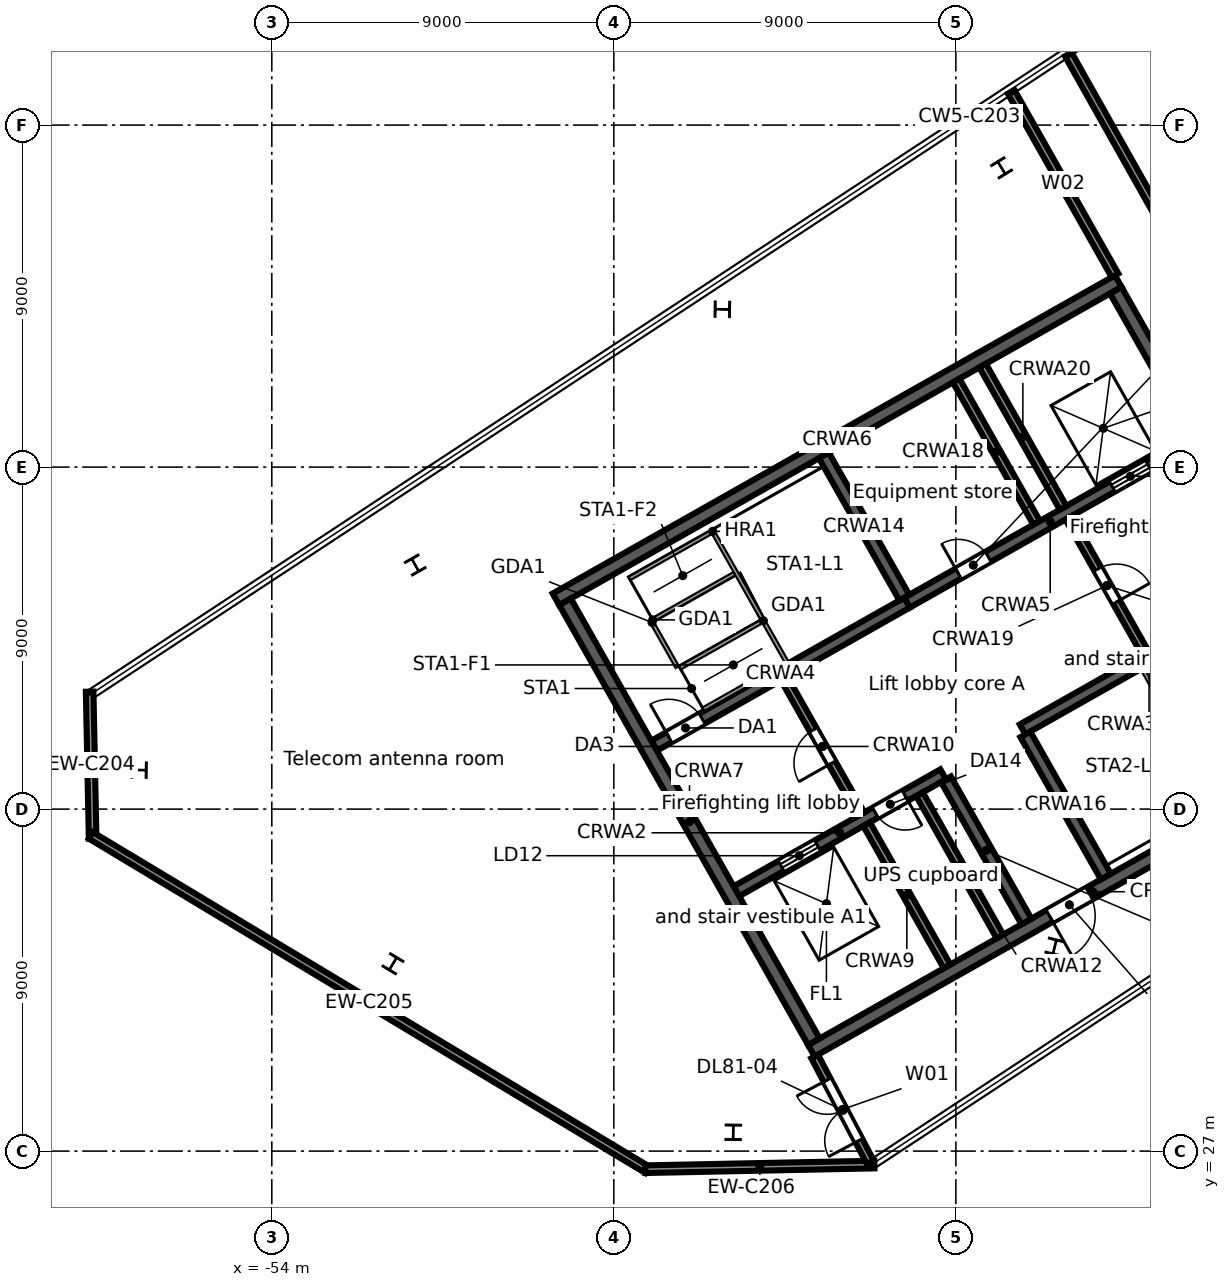
"""IFC4 building model, lengths in metres.
Left out: names, types, materials, properties, quantities, classifications, styles, units other than length and angle.
Written with IfcOpenShell. Run it as: python <this file> out.ifc"""

import sys

from ifc_helpers import new_model, si_unit, direction, frame, frame_2d, origin, origin_2d, place, context, subcontext, project, spatial, rectangle, i_section, extrude, element, fill, save


model = new_model("IFC4")
c1 = context("Model", 3, precision=1e-05, world=origin(), true_north=direction((0.0, 1.0)))
c2 = subcontext(c1, "Body", "Model", "MODEL_VIEW")
j1 = project(units=[si_unit("LENGTHUNIT", "METRE"), si_unit("PLANEANGLEUNIT", "RADIAN")], contexts=[c1])
p1 = place(None, origin())
s1 = spatial("IfcSite", under=j1, at=p1, CompositionType="ELEMENT")
p2 = place(p1, origin())
s2 = spatial("IfcBuilding", under=s1, at=p2, CompositionType="ELEMENT")
p3 = place(p2, frame((0.0, 0.0, 357.7)))
s3 = spatial("IfcBuildingStorey", under=s2, at=p3, CompositionType="ELEMENT", Elevation=357.7)
p4 = place(p3, frame((-50.226, 42.423, 0.0), z_axis=(0.0, 0.0, 1.0), x_axis=(-0.87035569594, -0.492423560103, 0.0)))
e1 = element("IfcColumn", 1, at=p4, inside=s3, PredefinedType="COLUMN", context=c2, shape_type="SweptSolid", body=[
    extrude(i_section(OverallWidth=0.4, OverallDepth=0.4, WebThickness=0.013, FlangeThickness=0.021, FilletRadius=0.022, at=origin_2d()), origin(), (0.0, 0.0, 1.0), 3.3),
])
for number, where, z_axis, x_axis in (
    (2, (-57.493, 37.027, 0.0), (0.0, 0.0, 1.0), (-0.013, -1.0, 0.0)),
    (3, (-50.812, 31.931, 0.0), (0.0, 0.0, 1.0), (0.857, -0.515, 0.0)),
    (4, (-41.858, 27.495, 0.0), (0.0, 0.0, 1.0), (1.0, -0.013, 0.0)),
):
    element("IfcColumn", number, at=place(p3, frame(where, z_axis=z_axis, x_axis=x_axis)), inside=s3, PredefinedType="COLUMN", context=c2, shape_type="SweptSolid", body=[
        extrude(i_section(OverallWidth=0.4, OverallDepth=0.4, WebThickness=0.013, FlangeThickness=0.021, FilletRadius=0.022, at=origin_2d()), origin(), (0.0, 0.0, 1.0), 3.6),
    ])
p5 = place(p3, frame((-34.798, 52.875, 0.0), z_axis=(0.0, 0.0, 1.0), x_axis=(0.85345985094, 0.521158596622, 0.0)))
e5 = element("IfcColumn", 5, at=p5, inside=s3, PredefinedType="COLUMN", context=c2, shape_type="SweptSolid", body=[
    extrude(i_section(OverallWidth=0.4, OverallDepth=0.4, WebThickness=0.013, FlangeThickness=0.021, FilletRadius=0.022, at=origin_2d()), origin(), (0.0, 0.0, 1.0), 3.3),
])
p6 = place(p3, frame((-42.144, 49.153, 0.0), z_axis=(0.0, 0.0, 1.0), x_axis=(0.017539659542, 0.999846168339, 0.0)))
e6 = element("IfcColumn", 6, at=p6, inside=s3, PredefinedType="COLUMN", context=c2, shape_type="SweptSolid", body=[
    extrude(i_section(OverallWidth=0.4, OverallDepth=0.4, WebThickness=0.013, FlangeThickness=0.021, FilletRadius=0.022, at=origin_2d()), origin(), (0.0, 0.0, 1.0), 3.6),
])
p7 = place(p3, frame((-33.4, 32.374, 0.0), z_axis=(0.0, 0.0, 1.0), x_axis=(-0.971092633177, 0.238702948851, 0.0)))
e7 = element("IfcColumn", 7, at=p7, inside=s3, PredefinedType="COLUMN", context=c2, shape_type="SweptSolid", body=[
    extrude(i_section(OverallWidth=0.4, OverallDepth=0.4, WebThickness=0.013, FlangeThickness=0.021, FilletRadius=0.022, at=origin_2d()), origin(), (0.0, 0.0, 1.0), 3.3),
])
p8 = place(p3, frame((-58.715, 35.225, 0.0), z_axis=(0.0, 0.0, 1.0), x_axis=(-0.020271225376, 0.999794517599, 0.0)))
e8 = element("IfcWall", 8, at=p8, inside=s3, PredefinedType="STANDARD", context=c2, shape_type="SweptSolid", body=[
    extrude(rectangle(XDim=3.866, YDim=0.2, at=frame_2d((1.933, 0.0))), origin(), (0.0, 0.0, 1.0), 3.3),
])
p9 = place(p3, frame((-44.119, 26.51, 0.0), z_axis=(0.0, 0.0, 1.0), x_axis=(-0.857172484352, 0.515029447769, 0.0)))
e9 = element("IfcWall", 9, at=p9, inside=s3, PredefinedType="STANDARD", context=c2, shape_type="SweptSolid", body=[
    extrude(rectangle(XDim=17.084, YDim=0.2, at=frame_2d((8.542, 0.0))), origin(), (0.0, 0.0, 1.0), 3.3),
])
p10 = place(p3, frame((-38.144, 26.646, 0.0), z_axis=(0.0, 0.0, 1.0), x_axis=(-0.999795108808, -0.020242045449, 0.0)))
e10 = element("IfcWall", 10, at=p10, inside=s3, PredefinedType="STANDARD", context=c2, shape_type="SweptSolid", body=[
    extrude(rectangle(XDim=6.031, YDim=0.2, at=frame_2d((3.015, 0.0))), origin(), (0.0, 0.0, 1.0), 3.3),
])
p11 = place(p3, frame((-39.801, 29.64, 0.0), z_axis=(0.0, 0.0, 1.0), x_axis=(0.870359753402, 0.492416388494, 0.0)))
e11 = element("IfcWall", 11, at=p11, inside=s3, PredefinedType="SOLIDWALL", context=c2, shape_type="SweptSolid", body=[
    extrude(rectangle(XDim=17.0, YDim=0.35, at=frame_2d((8.5, 0.0))), origin(), (0.0, 0.0, 1.0), 3.3),
])
p12 = place(p11, frame((7.2, 0.0, 0.0)))
e12 = element("IfcOpeningElement", 12, at=p12, cuts=e11, PredefinedType="OPENING", context=c2, shape_type="SweptSolid", body=[
    extrude(rectangle(XDim=1.2, YDim=2.1, at=frame_2d((0.6, 1.05))), frame((0.0, 0.185, 0.0), z_axis=(0.0, -1.0, 0.0), x_axis=(1.0, 0.0, 0.0)), (0.0, 0.0, 1.0), 0.37),
])
p13 = place(p3, frame((-41.774, 33.838, 0.0), z_axis=(0.0, 0.0, 1.0), x_axis=(0.870355415866, 0.492424055132, 0.0)))
e13 = element("IfcWall", 13, at=p13, inside=s3, PredefinedType="SOLIDWALL", context=c2, shape_type="SweptSolid", body=[
    extrude(rectangle(XDim=6.25, YDim=0.3, at=frame_2d((3.125, 0.0))), origin(), (0.0, 0.0, 1.0), 3.3),
])
p14 = place(p13, frame((1.35, 0.0, 0.0)))
e14 = element("IfcOpeningElement", 14, at=p14, cuts=e13, PredefinedType="OPENING", context=c2, shape_type="SweptSolid", body=[
    extrude(rectangle(XDim=1.1, YDim=2.1, at=frame_2d((0.55, 1.05))), frame((0.0, 0.16, 0.0), z_axis=(0.0, -1.0, 0.0), x_axis=(1.0, 0.0, 0.0)), (0.0, 0.0, 1.0), 0.32),
])
p15 = place(p13, frame((4.2, 0.0, 0.0)))
e15 = element("IfcOpeningElement", 15, at=p15, cuts=e13, PredefinedType="OPENING", context=c2, shape_type="SweptSolid", body=[
    extrude(rectangle(XDim=0.9, YDim=2.1, at=frame_2d((0.45, 1.05))), frame((0.0, 0.16, 0.0), z_axis=(0.0, -1.0, 0.0), x_axis=(1.0, 0.0, 0.0)), (0.0, 0.0, 1.0), 0.32),
])
p16 = place(p3, frame((-34.245, 38.097, 0.0), z_axis=(0.0, 0.0, 1.0), x_axis=(0.870352347706, 0.49242947804, 0.0)))
e16 = element("IfcWall", 16, at=p16, inside=s3, PredefinedType="SOLIDWALL", context=c2, shape_type="SweptSolid", body=[
    extrude(rectangle(XDim=7.65, YDim=0.3, at=frame_2d((3.825, 0.0))), origin(), (0.0, 0.0, 1.0), 3.3),
])
p17 = place(p16, frame((6.2, 0.0, 0.0)))
e17 = element("IfcOpeningElement", 17, at=p17, cuts=e16, PredefinedType="OPENING", context=c2, shape_type="SweptSolid", body=[
    extrude(rectangle(XDim=1.0, YDim=2.1, at=frame_2d((0.5, 1.05))), frame((0.0, 0.16, 0.0), z_axis=(0.0, -1.0, 0.0), x_axis=(1.0, 0.0, 0.0)), (0.0, 0.0, 1.0), 0.32),
])
p18 = place(p3, frame((-43.94, 37.667, 0.0), z_axis=(0.0, 0.0, 1.0), x_axis=(0.870352347706, 0.49242947804, 0.0)))
e18 = element("IfcWall", 18, at=p18, inside=s3, PredefinedType="SOLIDWALL", context=c2, shape_type="SweptSolid", body=[
    extrude(rectangle(XDim=7.65, YDim=0.3, at=frame_2d((3.825, 0.0))), origin(), (0.0, 0.0, 1.0), 3.3),
])
p19 = place(p18, frame((0.45, 0.0, 0.0)))
e19 = element("IfcOpeningElement", 19, at=p19, cuts=e18, PredefinedType="OPENING", context=c2, shape_type="SweptSolid", body=[
    extrude(rectangle(XDim=1.0, YDim=2.1, at=frame_2d((0.5, 1.05))), frame((0.0, 0.16, 0.0), z_axis=(0.0, -1.0, 0.0), x_axis=(1.0, 0.0, 0.0)), (0.0, 0.0, 1.0), 0.32),
])
p20 = place(p3, frame((-37.282, 41.435, 0.0), z_axis=(0.0, 0.0, 1.0), x_axis=(0.870364588774, 0.492407841741, 0.0)))
e20 = element("IfcWall", 20, at=p20, inside=s3, PredefinedType="SOLIDWALL", context=c2, shape_type="SweptSolid", body=[
    extrude(rectangle(XDim=8.65, YDim=0.3, at=frame_2d((4.325, 0.0))), origin(), (0.0, 0.0, 1.0), 3.3),
])
p21 = place(p20, frame((6.2, 0.0, 0.0)))
e21 = element("IfcOpeningElement", 21, at=p21, cuts=e20, PredefinedType="OPENING", context=c2, shape_type="SweptSolid", body=[
    extrude(rectangle(XDim=1.1, YDim=2.1, at=frame_2d((0.55, 1.05))), frame((0.0, 0.16, 0.0), z_axis=(0.0, -1.0, 0.0), x_axis=(1.0, 0.0, 0.0)), (0.0, 0.0, 1.0), 0.32),
])
p22 = place(p20, frame((1.55, 0.0, 0.0)))
e22 = element("IfcOpeningElement", 22, at=p22, cuts=e20, PredefinedType="OPENING", context=c2, shape_type="SweptSolid", body=[
    extrude(rectangle(XDim=0.9, YDim=2.1, at=frame_2d((0.45, 1.05))), frame((0.0, 0.16, 0.0), z_axis=(0.0, -1.0, 0.0), x_axis=(1.0, 0.0, 0.0)), (0.0, 0.0, 1.0), 0.32),
])
p23 = place(p3, frame((-46.522, 41.521, 0.0), z_axis=(0.0, 0.0, 1.0), x_axis=(0.870359753402, 0.492416388494, 0.0)))
e23 = element("IfcWall", 23, at=p23, inside=s3, PredefinedType="SOLIDWALL", context=c2, shape_type="SweptSolid", body=[
    extrude(rectangle(XDim=17.0, YDim=0.35, at=frame_2d((8.5, 0.0))), origin(), (0.0, 0.0, 1.0), 3.3),
])
p24 = place(p3, frame((-46.284, 41.454, 0.0), z_axis=(0.0, 0.0, 1.0), x_axis=(0.492429810477, -0.870352159619, 0.0)))
e24 = element("IfcWall", 24, at=p24, inside=s3, PredefinedType="SOLIDWALL", context=c2, shape_type="SweptSolid", body=[
    extrude(rectangle(XDim=13.3, YDim=0.35, at=frame_2d((6.65, 0.0))), origin(), (0.0, 0.0, 1.0), 3.3),
])
p25 = place(p3, frame((-38.349, 35.603, 0.0), z_axis=(0.0, 0.0, 1.0), x_axis=(0.492410799949, -0.870362915164, 0.0)))
e25 = element("IfcWall", 25, at=p25, inside=s3, PredefinedType="SOLIDWALL", context=c2, shape_type="SweptSolid", body=[
    extrude(rectangle(XDim=4.3, YDim=0.2, at=frame_2d((2.15, 0.0))), origin(), (0.0, 0.0, 1.0), 3.3),
])
p26 = place(p3, frame((-40.516, 39.433, 0.0), z_axis=(0.0, 0.0, 1.0), x_axis=(0.492453559952, -0.87033872216, 0.0)))
e26 = element("IfcWall", 26, at=p26, inside=s3, PredefinedType="PARTITIONING", context=c2, shape_type="SweptSolid", body=[
    extrude(rectangle(XDim=4.1, YDim=0.2, at=frame_2d((2.05, 0.0))), origin(), (0.0, 0.0, 1.0), 3.3),
])
p27 = place(p26, frame((1.55, 0.0, 0.0)))
e27 = element("IfcOpeningElement", 27, at=p27, cuts=e26, PredefinedType="OPENING", context=c2, shape_type="SweptSolid", body=[
    extrude(rectangle(XDim=1.0, YDim=2.1, at=frame_2d((0.5, 1.05))), frame((0.0, 0.11, 0.0), z_axis=(0.0, -1.0, 0.0), x_axis=(1.0, 0.0, 0.0)), (0.0, 0.0, 1.0), 0.22),
])
p28 = place(p3, frame((-36.956, 36.391, 0.0), z_axis=(0.0, 0.0, 1.0), x_axis=(0.492410799949, -0.870362915164, 0.0)))
e28 = element("IfcWall", 28, at=p28, inside=s3, PredefinedType="SOLIDWALL", context=c2, shape_type="SweptSolid", body=[
    extrude(rectangle(XDim=4.3, YDim=0.2, at=frame_2d((2.15, 0.0))), origin(), (0.0, 0.0, 1.0), 3.3),
])
p29 = place(p3, frame((-36.26, 36.785, 0.0), z_axis=(0.0, 0.0, 1.0), x_axis=(0.492435133428, -0.870349147967, 0.0)))
e29 = element("IfcWall", 29, at=p29, inside=s3, PredefinedType="SOLIDWALL", context=c2, shape_type="SweptSolid", body=[
    extrude(rectangle(XDim=4.3, YDim=0.3, at=frame_2d((2.15, 0.0))), origin(), (0.0, 0.0, 1.0), 3.3),
])
p30 = place(p3, frame((-39.473, 45.308, 0.0), z_axis=(0.0, 0.0, 1.0), x_axis=(0.492410799949, -0.870362915164, 0.0)))
e30 = element("IfcWall", 30, at=p30, inside=s3, PredefinedType="SOLIDWALL", context=c2, shape_type="SweptSolid", body=[
    extrude(rectangle(XDim=4.3, YDim=0.3, at=frame_2d((2.15, 0.0))), origin(), (0.0, 0.0, 1.0), 3.3),
])
p31 = place(p3, frame((-34.171, 37.967, 0.0), z_axis=(0.0, 0.0, 1.0), x_axis=(0.492435133428, -0.870349147967, 0.0)))
e31 = element("IfcWall", 31, at=p31, inside=s3, PredefinedType="SOLIDWALL", context=c2, shape_type="SweptSolid", body=[
    extrude(rectangle(XDim=4.3, YDim=0.3, at=frame_2d((2.15, 0.0))), origin(), (0.0, 0.0, 1.0), 3.3),
])
p32 = place(p3, frame((-35.992, 47.277, 0.0), z_axis=(0.0, 0.0, 1.0), x_axis=(0.492410799949, -0.870362915164, 0.0)))
e32 = element("IfcWall", 32, at=p32, inside=s3, PredefinedType="SOLIDWALL", context=c2, shape_type="SweptSolid", body=[
    extrude(rectangle(XDim=4.3, YDim=0.2, at=frame_2d((2.15, 0.0))), origin(), (0.0, 0.0, 1.0), 3.3),
])
p33 = place(p3, frame((-33.031, 43.667, 0.0), z_axis=(0.0, 0.0, 1.0), x_axis=(0.492408451753, -0.87036424366, 0.0)))
e33 = element("IfcWall", 33, at=p33, inside=s3, PredefinedType="PARTITIONING", context=c2, shape_type="SweptSolid", body=[
    extrude(rectangle(XDim=4.1, YDim=0.2, at=frame_2d((2.05, 0.0))), origin(), (0.0, 0.0, 1.0), 3.3),
])
p34 = place(p33, frame((1.55, 0.0, 0.0)))
e34 = element("IfcOpeningElement", 34, at=p34, cuts=e33, PredefinedType="OPENING", context=c2, shape_type="SweptSolid", body=[
    extrude(rectangle(XDim=1.0, YDim=2.1, at=frame_2d((0.5, 1.05))), frame((0.0, 0.11, 0.0), z_axis=(0.0, -1.0, 0.0), x_axis=(1.0, 0.0, 0.0)), (0.0, 0.0, 1.0), 0.22),
])
p35 = place(p3, frame((-35.296, 47.671, 0.0), z_axis=(0.0, 0.0, 1.0), x_axis=(0.492435133428, -0.870349147967, 0.0)))
e35 = element("IfcWall", 35, at=p35, inside=s3, PredefinedType="SOLIDWALL", context=c2, shape_type="SweptSolid", body=[
    extrude(rectangle(XDim=4.3, YDim=0.2, at=frame_2d((2.15, 0.0))), origin(), (0.0, 0.0, 1.0), 3.3),
])
p36 = place(p3, frame((-31.792, 49.653, 0.0), z_axis=(0.0, 0.0, 1.0), x_axis=(0.492421943245, -0.870356610712, 0.0)))
e36 = element("IfcWall", 36, at=p36, inside=s3, PredefinedType="SOLIDWALL", context=c2, shape_type="SweptSolid", body=[
    extrude(rectangle(XDim=13.3, YDim=0.35, at=frame_2d((6.65, 0.0))), origin(), (0.0, 0.0, 1.0), 3.3),
])
p37 = place(p3, frame((-39.715, 29.488, 0.0), z_axis=(0.0, 0.0, 1.0), x_axis=(0.465711249011, -0.884936739289, 0.0)))
e37 = element("IfcWall", 37, at=p37, inside=s3, PredefinedType="PARTITIONING", context=c2, shape_type="SweptSolid", body=[
    extrude(rectangle(XDim=3.146, YDim=0.2, at=frame_2d((1.573, 0.0))), origin(), (0.0, 0.0, 1.0), 2.68),
])
p38 = place(p37, frame((0.7, 0.0, 0.0)))
e38 = element("IfcOpeningElement", 38, at=p38, cuts=e37, PredefinedType="OPENING", context=c2, shape_type="SweptSolid", body=[
    extrude(rectangle(XDim=1.8, YDim=2.1, at=frame_2d((0.9, 1.05))), frame((0.0, 0.11, 0.0), z_axis=(0.0, -1.0, 0.0), x_axis=(1.0, 0.0, 0.0)), (0.0, 0.0, 1.0), 0.22),
])
p39 = place(p3, frame((-34.544, 54.873, 0.0), z_axis=(0.0, 0.0, 1.0), x_axis=(0.492390708412, -0.870374281714, 0.0)))
e39 = element("IfcWall", 39, at=p39, inside=s3, PredefinedType="PARTITIONING", context=c2, shape_type="SweptSolid", body=[
    extrude(rectangle(XDim=5.548, YDim=0.2, at=frame_2d((2.774, 0.0))), origin(), (0.0, 0.0, 1.0), 2.18),
])
p40 = place(p3, frame((-33.042, 55.86, 0.0), z_axis=(0.0, 0.0, 1.0), x_axis=(0.490288138745, -0.871560405828, 0.0)))
e40 = element("IfcWall", 40, at=p40, inside=s3, PredefinedType="PARTITIONING", context=c2, shape_type="SweptSolid", body=[
    extrude(rectangle(XDim=17.667, YDim=0.2, at=frame_2d((8.834, 0.0))), origin(), (0.0, 0.0, 1.0), 2.18),
])
p41 = place(p21, origin())
e41 = element("IfcDoor", 41, at=p41, inside=s3, OperationType="DOUBLE_DOOR_SLIDING", PredefinedType="DOOR", context=c2, shape_type="SweptSolid", body=[
    extrude(rectangle(XDim=1.1, YDim=2.1, at=frame_2d((0.55, 1.05))), frame((0.0, 0.025, 0.0), z_axis=(0.0, -1.0, 0.0), x_axis=(1.0, 0.0, 0.0)), (0.0, 0.0, 1.0), 0.05),
])
fill(e21, e41)
p42 = place(p14, origin())
e42 = element("IfcDoor", 42, at=p42, inside=s3, OperationType="DOUBLE_DOOR_SLIDING", PredefinedType="DOOR", context=c2, shape_type="SweptSolid", body=[
    extrude(rectangle(XDim=1.1, YDim=2.1, at=frame_2d((0.55, 1.05))), frame((0.0, 0.025, 0.0), z_axis=(0.0, -1.0, 0.0), x_axis=(1.0, 0.0, 0.0)), (0.0, 0.0, 1.0), 0.05),
])
fill(e14, e42)
p43 = place(p19, origin())
e43 = element("IfcDoor", 43, at=p43, inside=s3, OperationType="SINGLE_SWING_LEFT", PredefinedType="DOOR", context=c2, shape_type="SweptSolid", body=[
    extrude(rectangle(XDim=1.0, YDim=2.1, at=frame_2d((0.5, 1.05))), frame((0.0, 0.025, 0.0), z_axis=(0.0, -1.0, 0.0), x_axis=(1.0, 0.0, 0.0)), (0.0, 0.0, 1.0), 0.05),
])
fill(e19, e43)
p44 = place(p27, frame((1.0, 0.0, 0.0), z_axis=(0.0, 0.0, 1.0), x_axis=(-1.0, 0.0, 0.0)))
e44 = element("IfcDoor", 44, at=p44, inside=s3, OperationType="SINGLE_SWING_LEFT", PredefinedType="DOOR", context=c2, shape_type="SweptSolid", body=[
    extrude(rectangle(XDim=1.0, YDim=2.1, at=frame_2d((0.5, 1.05))), frame((0.0, 0.025, 0.0), z_axis=(0.0, -1.0, 0.0), x_axis=(1.0, 0.0, 0.0)), (0.0, 0.0, 1.0), 0.05),
])
fill(e27, e44)
p45 = place(p34, origin())
e45 = element("IfcDoor", 45, at=p45, inside=s3, OperationType="SINGLE_SWING_RIGHT", PredefinedType="DOOR", context=c2, shape_type="SweptSolid", body=[
    extrude(rectangle(XDim=1.0, YDim=2.1, at=frame_2d((0.5, 1.05))), frame((0.0, 0.025, 0.0), z_axis=(0.0, -1.0, 0.0), x_axis=(1.0, 0.0, 0.0)), (0.0, 0.0, 1.0), 0.05),
])
fill(e34, e45)
p46 = place(p12, frame((1.2, 0.0, 0.0), z_axis=(0.0, 0.0, 1.0), x_axis=(-1.0, 0.0, 0.0)))
e46 = element("IfcDoor", 46, at=p46, inside=s3, OperationType="SINGLE_SWING_RIGHT", PredefinedType="DOOR", context=c2, shape_type="SweptSolid", body=[
    extrude(rectangle(XDim=1.2, YDim=2.1, at=frame_2d((0.6, 1.05))), frame((0.0, 0.025, 0.0), z_axis=(0.0, -1.0, 0.0), x_axis=(1.0, 0.0, 0.0)), (0.0, 0.0, 1.0), 0.05),
])
fill(e12, e46)
p47 = place(p22, origin())
e47 = element("IfcDoor", 47, at=p47, inside=s3, OperationType="SINGLE_SWING_LEFT", PredefinedType="DOOR", context=c2, shape_type="SweptSolid", body=[
    extrude(rectangle(XDim=0.9, YDim=2.1, at=frame_2d((0.45, 1.05))), frame((0.0, 0.025, 0.0), z_axis=(0.0, -1.0, 0.0), x_axis=(1.0, 0.0, 0.0)), (0.0, 0.0, 1.0), 0.05),
])
fill(e22, e47)
p48 = place(p15, frame((0.9, 0.0, 0.0), z_axis=(0.0, 0.0, 1.0), x_axis=(-1.0, 0.0, 0.0)))
e48 = element("IfcDoor", 48, at=p48, inside=s3, OperationType="SINGLE_SWING_LEFT", PredefinedType="DOOR", context=c2, shape_type="SweptSolid", body=[
    extrude(rectangle(XDim=0.9, YDim=2.1, at=frame_2d((0.45, 1.05))), frame((0.0, 0.025, 0.0), z_axis=(0.0, -1.0, 0.0), x_axis=(1.0, 0.0, 0.0)), (0.0, 0.0, 1.0), 0.05),
])
fill(e15, e48)
p49 = place(p38, frame((1.8, 0.0, 0.0), z_axis=(0.0, 0.0, 1.0), x_axis=(-1.0, 0.0, 0.0)))
e49 = element("IfcDoor", 49, at=p49, inside=s3, OperationType="DOUBLE_DOOR_SINGLE_SWING", PredefinedType="DOOR", context=c2, shape_type="SweptSolid", body=[
    extrude(rectangle(XDim=1.8, YDim=2.1, at=frame_2d((0.9, 1.05))), frame((0.0, 0.025, 0.0), z_axis=(0.0, -1.0, 0.0), x_axis=(1.0, 0.0, 0.0)), (0.0, 0.0, 1.0), 0.05),
])
fill(e38, e49)
save(model, sys.argv[1])
